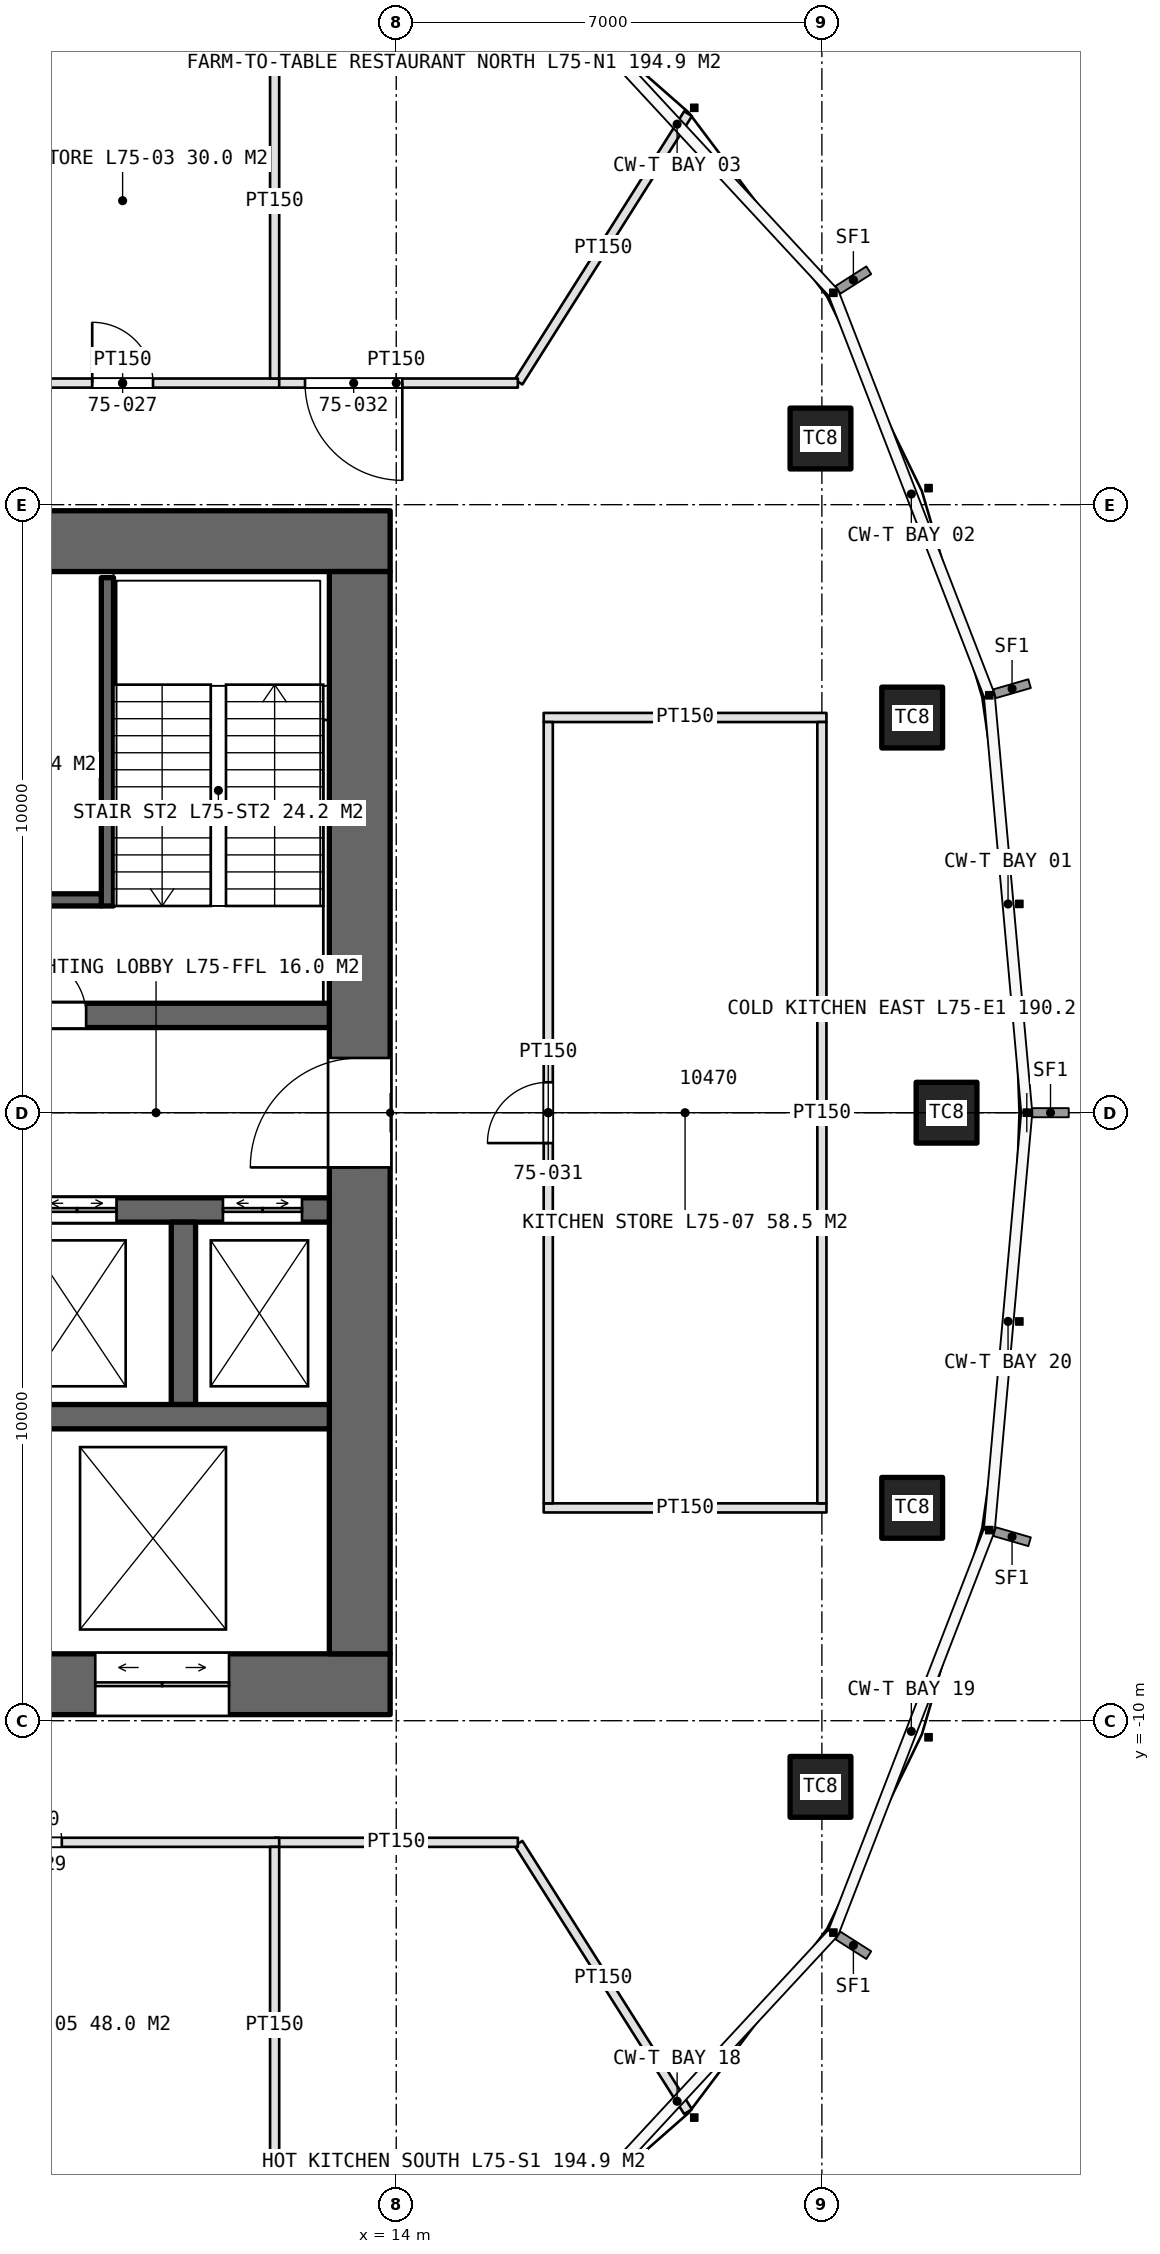
"""IFC4 building model, lengths in metres.
Left out: names, types, materials, properties, quantities, classifications, styles, units other than length and angle.
Written with IfcOpenShell. Run it as: python <this file> out.ifc"""

import sys

from ifc_helpers import new_model, si_unit, direction, frame, frame_2d, origin, origin_2d, place, context, subcontext, project, spatial, rectangle, extrude, element, fill, save


model = new_model("IFC4")
c1 = context("Model", 3, precision=1e-05, world=origin(), true_north=direction((0.0, 1.0)))
c2 = subcontext(c1, "Body", "Model", "MODEL_VIEW")
j1 = project(units=[si_unit("LENGTHUNIT", "METRE"), si_unit("PLANEANGLEUNIT", "RADIAN")], contexts=[c1])
p1 = place(None, origin())
s1 = spatial("IfcSite", under=j1, at=p1, CompositionType="ELEMENT")
p2 = place(p1, origin())
s2 = spatial("IfcBuilding", under=s1, at=p2, CompositionType="ELEMENT")
p3 = place(p2, frame((0.0, 0.0, 334.2)))
s3 = spatial("IfcBuildingStorey", under=s2, at=p3, CompositionType="ELEMENT", Elevation=334.2)
p4 = place(p3, frame((-13.9, -9.4, 0.0), z_axis=(0.0, 0.0, 1.0), x_axis=(1.0, 0.0, 0.0)))
e1 = element("IfcWall", 1, at=p4, inside=s3, PredefinedType="SHEAR", context=c2, shape_type="SweptSolid", body=[
    extrude(rectangle(XDim=27.8, YDim=1.0, at=frame_2d((13.9, 0.0))), origin(), (0.0, 0.0, 1.0), 5.0),
])
p5 = place(p4, frame((22.95, 0.0, 0.0)))
e2 = element("IfcOpeningElement", 2, at=p5, cuts=e1, PredefinedType="OPENING", context=c2, shape_type="SweptSolid", body=[
    extrude(rectangle(XDim=2.2, YDim=2.7, at=frame_2d((1.1, 1.35))), frame((0.0, 0.51, 0.0), z_axis=(0.0, -1.0, 0.0), x_axis=(1.0, 0.0, 0.0)), (0.0, 0.0, 1.0), 1.02),
])
p6 = place(p3, frame((13.9, 9.4, 0.0), z_axis=(0.0, 0.0, 1.0), x_axis=(-1.0, 0.0, 0.0)))
e3 = element("IfcWall", 3, at=p6, inside=s3, PredefinedType="SHEAR", context=c2, shape_type="SweptSolid", body=[
    extrude(rectangle(XDim=27.8, YDim=1.0, at=frame_2d((13.9, 0.0))), origin(), (0.0, 0.0, 1.0), 5.0),
])
p7 = place(p6, frame((23.9, 0.0, 0.0)))
e4 = element("IfcOpeningElement", 4, at=p7, cuts=e3, PredefinedType="OPENING", context=c2, shape_type="SweptSolid", body=[
    extrude(rectangle(XDim=1.0, YDim=2.4, at=frame_2d((0.5, 1.2))), frame((0.0, 0.51, 0.0), z_axis=(0.0, -1.0, 0.0), x_axis=(1.0, 0.0, 0.0)), (0.0, 0.0, 1.0), 1.02),
])
p8 = place(p6, frame((13.0, 0.0, 0.0)))
e5 = element("IfcOpeningElement", 5, at=p8, cuts=e3, PredefinedType="OPENING", context=c2, shape_type="SweptSolid", body=[
    extrude(rectangle(XDim=1.8, YDim=2.4, at=frame_2d((0.9, 1.2))), frame((0.0, 0.51, 0.0), z_axis=(0.0, -1.0, 0.0), x_axis=(1.0, 0.0, 0.0)), (0.0, 0.0, 1.0), 1.02),
])
p9 = place(p3, frame((13.4, -8.9, 0.0), z_axis=(0.0, 0.0, 1.0), x_axis=(0.0, 1.0, 0.0)))
e6 = element("IfcWall", 6, at=p9, inside=s3, PredefinedType="SHEAR", context=c2, shape_type="SweptSolid", body=[
    extrude(rectangle(XDim=17.8, YDim=1.0, at=frame_2d((8.9, 0.0))), origin(), (0.0, 0.0, 1.0), 5.0),
])
p10 = place(p9, frame((8.0, 0.0, 0.0)))
e7 = element("IfcOpeningElement", 7, at=p10, cuts=e6, PredefinedType="OPENING", context=c2, shape_type="SweptSolid", body=[
    extrude(rectangle(XDim=1.8, YDim=2.4, at=frame_2d((0.9, 1.2))), frame((0.0, 0.51, 0.0), z_axis=(0.0, -1.0, 0.0), x_axis=(1.0, 0.0, 0.0)), (0.0, 0.0, 1.0), 1.02),
])
p11 = place(p3, frame((7.2, 1.6, 0.0), z_axis=(0.0, 0.0, 1.0), x_axis=(1.0, 0.0, 0.0)))
e8 = element("IfcWall", 8, at=p11, inside=s3, PredefinedType="SHEAR", context=c2, shape_type="SweptSolid", body=[
    extrude(rectangle(XDim=5.7, YDim=0.4, at=frame_2d((2.85, 0.0))), origin(), (0.0, 0.0, 1.0), 5.0),
])
p12 = place(p11, frame((0.7, 0.0, 0.0)))
e9 = element("IfcOpeningElement", 9, at=p12, cuts=e8, PredefinedType="OPENING", context=c2, shape_type="SweptSolid", body=[
    extrude(rectangle(XDim=1.0, YDim=2.4, at=frame_2d((0.5, 1.2))), frame((0.0, 0.21, 0.0), z_axis=(0.0, -1.0, 0.0), x_axis=(1.0, 0.0, 0.0)), (0.0, 0.0, 1.0), 0.42),
])
p13 = place(p3, frame((7.2, -1.6, 0.0), z_axis=(0.0, 0.0, 1.0), x_axis=(1.0, 0.0, 0.0)))
e10 = element("IfcWall", 10, at=p13, inside=s3, PredefinedType="SHEAR", context=c2, shape_type="SweptSolid", body=[
    extrude(rectangle(XDim=5.7, YDim=0.4, at=frame_2d((2.85, 0.0))), origin(), (0.0, 0.0, 1.0), 5.0),
])
p14 = place(p13, frame((0.9, 0.0, 0.0)))
e11 = element("IfcOpeningElement", 11, at=p14, cuts=e10, PredefinedType="OPENING", context=c2, shape_type="SweptSolid", body=[
    extrude(rectangle(XDim=1.3, YDim=2.4, at=frame_2d((0.65, 1.2))), frame((0.0, 0.21, 0.0), z_axis=(0.0, -1.0, 0.0), x_axis=(1.0, 0.0, 0.0)), (0.0, 0.0, 1.0), 0.42),
])
p15 = place(p13, frame((3.95, 0.0, 0.0)))
e12 = element("IfcOpeningElement", 12, at=p15, cuts=e10, PredefinedType="OPENING", context=c2, shape_type="SweptSolid", body=[
    extrude(rectangle(XDim=1.3, YDim=2.4, at=frame_2d((0.65, 1.2))), frame((0.0, 0.21, 0.0), z_axis=(0.0, -1.0, 0.0), x_axis=(1.0, 0.0, 0.0)), (0.0, 0.0, 1.0), 0.42),
])
p16 = place(p3, frame((10.5, -4.8, 0.0), z_axis=(0.0, 0.0, 1.0), x_axis=(0.0, 1.0, 0.0)))
e13 = element("IfcWall", 13, at=p16, inside=s3, PredefinedType="SHEAR", context=c2, shape_type="SweptSolid", body=[
    extrude(rectangle(XDim=3.0, YDim=0.4, at=frame_2d((1.5, 0.0))), origin(), (0.0, 0.0, 1.0), 5.0),
])
p17 = place(p3, frame((7.2, -5.0, 0.0), z_axis=(0.0, 0.0, 1.0), x_axis=(1.0, 0.0, 0.0)))
e14 = element("IfcWall", 14, at=p17, inside=s3, PredefinedType="SHEAR", context=c2, shape_type="SweptSolid", body=[
    extrude(rectangle(XDim=5.7, YDim=0.4, at=frame_2d((2.85, 0.0))), origin(), (0.0, 0.0, 1.0), 5.0),
])
for number, where, z_axis, x_axis in (
    (15, (23.05, 0.0, 0.0), (0.0, 0.0, 1.0), (1.0, 0.0, 0.0)),
    (16, (22.485, 6.499, 0.0), (0.0, 0.0, 1.0), (1.0, 0.0, 0.0)),
    (17, (20.977, 11.088, 0.0), (0.0, 0.0, 1.0), (1.0, 0.0, 0.0)),
    (18, (20.977, -11.088, 0.0), (0.0, 0.0, 1.0), (1.0, 0.0, 0.0)),
    (19, (22.485, -6.499, 0.0), (0.0, 0.0, 1.0), (1.0, 0.0, 0.0)),
):
    element("IfcColumn", number, at=place(p3, frame(where, z_axis=z_axis, x_axis=x_axis)), inside=s3, PredefinedType="COLUMN", context=c2, shape_type="SweptSolid", body=[
        extrude(rectangle(XDim=1.0, YDim=1.0, at=origin_2d()), origin(), (0.0, 0.0, 1.0), 5.0),
    ])
p18 = place(p3, frame((9.25, 3.4, 0.0), z_axis=(0.0, 0.0, 1.0), x_axis=(0.0, 1.0, 0.0)))
e20 = element("IfcWall", 20, at=p18, inside=s3, PredefinedType="SOLIDWALL", context=c2, shape_type="SweptSolid", body=[
    extrude(rectangle(XDim=5.4, YDim=0.2, at=frame_2d((2.7, 0.0))), origin(), (0.0, 0.0, 1.0), 5.0),
])
p19 = place(p3, frame((9.15, 3.5, 0.0), z_axis=(0.0, 0.0, 1.0), x_axis=(-1.0, 0.0, 0.0)))
e21 = element("IfcWall", 21, at=p19, inside=s3, PredefinedType="SOLIDWALL", context=c2, shape_type="SweptSolid", body=[
    extrude(rectangle(XDim=1.95, YDim=0.2, at=frame_2d((0.975, 0.0))), origin(), (0.0, 0.0, 1.0), 5.0),
])
for number, where, z_axis, x_axis in (
    (22, (16.011, -12.017, 0.0), (0.0, 0.0, 1.0), (0.534, -0.845, 0.0)),
    (23, (16.011, 12.017, 0.0), (0.0, 0.0, 1.0), (0.534, 0.845, 0.0)),
):
    element("IfcWall", number, at=place(p3, frame(where, z_axis=z_axis, x_axis=x_axis)), inside=s3, PredefinedType="PARTITIONING", context=c2, shape_type="SweptSolid", body=[
        extrude(rectangle(XDim=5.22, YDim=0.15, at=frame_2d((2.61, 0.0))), origin(), (0.0, 0.0, 1.0), 3.4),
    ])
p20 = place(p3, frame((16.0, 12.0, 0.0), z_axis=(0.0, 0.0, 1.0), x_axis=(-1.0, 0.0, 0.0)))
e24 = element("IfcWall", 24, at=p20, inside=s3, PredefinedType="PARTITIONING", context=c2, shape_type="SweptSolid", body=[
    extrude(rectangle(XDim=4.0, YDim=0.15, at=frame_2d((2.0, 0.0))), origin(), (0.0, 0.0, 1.0), 3.4),
])
p21 = place(p20, frame((1.9, 0.0, 0.0)))
e25 = element("IfcOpeningElement", 25, at=p21, cuts=e24, PredefinedType="OPENING", context=c2, shape_type="SweptSolid", body=[
    extrude(rectangle(XDim=1.6, YDim=2.4, at=frame_2d((0.8, 1.2))), frame((0.0, 0.085, 0.0), z_axis=(0.0, -1.0, 0.0), x_axis=(1.0, 0.0, 0.0)), (0.0, 0.0, 1.0), 0.17),
])
p22 = place(p3, frame((12.0, -12.0, 0.0), z_axis=(0.0, 0.0, 1.0), x_axis=(1.0, 0.0, 0.0)))
e26 = element("IfcWall", 26, at=p22, inside=s3, PredefinedType="PARTITIONING", context=c2, shape_type="SweptSolid", body=[
    extrude(rectangle(XDim=4.0, YDim=0.15, at=frame_2d((2.0, 0.0))), origin(), (0.0, 0.0, 1.0), 3.4),
])
p23 = place(p3, frame((6.925, 12.0, 0.0), z_axis=(0.0, 0.0, 1.0), x_axis=(1.0, 0.0, 0.0)))
e27 = element("IfcWall", 27, at=p23, inside=s3, PredefinedType="PARTITIONING", context=c2, shape_type="SweptSolid", body=[
    extrude(rectangle(XDim=5.15, YDim=0.15, at=frame_2d((2.575, 0.0))), origin(), (0.0, 0.0, 1.0), 3.4),
])
p24 = place(p23, frame((2.075, 0.0, 0.0)))
e28 = element("IfcOpeningElement", 28, at=p24, cuts=e27, PredefinedType="OPENING", context=c2, shape_type="SweptSolid", body=[
    extrude(rectangle(XDim=1.0, YDim=2.2, at=frame_2d((0.5, 1.1))), frame((0.0, 0.085, 0.0), z_axis=(0.0, -1.0, 0.0), x_axis=(1.0, 0.0, 0.0)), (0.0, 0.0, 1.0), 0.17),
])
p25 = place(p3, frame((12.0, 12.075, 0.0), z_axis=(0.0, 0.0, 1.0), x_axis=(0.0, 1.0, 0.0)))
e29 = element("IfcWall", 29, at=p25, inside=s3, PredefinedType="PARTITIONING", context=c2, shape_type="SweptSolid", body=[
    extrude(rectangle(XDim=5.85, YDim=0.15, at=frame_2d((2.925, 0.0))), origin(), (0.0, 0.0, 1.0), 3.4),
])
p26 = place(p3, frame((3.925, -12.0, 0.0), z_axis=(0.0, 0.0, 1.0), x_axis=(1.0, 0.0, 0.0)))
e30 = element("IfcWall", 30, at=p26, inside=s3, PredefinedType="PARTITIONING", context=c2, shape_type="SweptSolid", body=[
    extrude(rectangle(XDim=8.15, YDim=0.15, at=frame_2d((4.075, 0.0))), origin(), (0.0, 0.0, 1.0), 3.4),
])
p27 = place(p26, frame((3.575, 0.0, 0.0)))
e31 = element("IfcOpeningElement", 31, at=p27, cuts=e30, PredefinedType="OPENING", context=c2, shape_type="SweptSolid", body=[
    extrude(rectangle(XDim=1.0, YDim=2.2, at=frame_2d((0.5, 1.1))), frame((0.0, 0.085, 0.0), z_axis=(0.0, -1.0, 0.0), x_axis=(1.0, 0.0, 0.0)), (0.0, 0.0, 1.0), 0.17),
])
p28 = place(p3, frame((12.0, -17.925, 0.0), z_axis=(0.0, 0.0, 1.0), x_axis=(0.0, 1.0, 0.0)))
e32 = element("IfcWall", 32, at=p28, inside=s3, PredefinedType="PARTITIONING", context=c2, shape_type="SweptSolid", body=[
    extrude(rectangle(XDim=5.85, YDim=0.15, at=frame_2d((2.925, 0.0))), origin(), (0.0, 0.0, 1.0), 3.4),
])
for number, where, z_axis, x_axis in (
    (33, (16.425, -6.5, 0.0), (0.0, 0.0, 1.0), (1.0, 0.0, 0.0)),
    (34, (16.425, 6.5, 0.0), (0.0, 0.0, 1.0), (1.0, 0.0, 0.0)),
):
    element("IfcWall", number, at=place(p3, frame(where, z_axis=z_axis, x_axis=x_axis)), inside=s3, PredefinedType="PARTITIONING", context=c2, shape_type="SweptSolid", body=[
        extrude(rectangle(XDim=4.65, YDim=0.15, at=frame_2d((2.325, 0.0))), origin(), (0.0, 0.0, 1.0), 3.4),
    ])
p29 = place(p3, frame((16.5, -6.425, 0.0), z_axis=(0.0, 0.0, 1.0), x_axis=(0.0, 1.0, 0.0)))
e35 = element("IfcWall", 35, at=p29, inside=s3, PredefinedType="PARTITIONING", context=c2, shape_type="SweptSolid", body=[
    extrude(rectangle(XDim=12.85, YDim=0.15, at=frame_2d((6.425, 0.0))), origin(), (0.0, 0.0, 1.0), 3.4),
])
p30 = place(p29, frame((5.925, 0.0, 0.0)))
e36 = element("IfcOpeningElement", 36, at=p30, cuts=e35, PredefinedType="OPENING", context=c2, shape_type="SweptSolid", body=[
    extrude(rectangle(XDim=1.0, YDim=2.2, at=frame_2d((0.5, 1.1))), frame((0.0, 0.085, 0.0), z_axis=(0.0, -1.0, 0.0), x_axis=(1.0, 0.0, 0.0)), (0.0, 0.0, 1.0), 0.17),
])
p31 = place(p3, frame((21.0, -6.425, 0.0), z_axis=(0.0, 0.0, 1.0), x_axis=(0.0, 1.0, 0.0)))
e37 = element("IfcWall", 37, at=p31, inside=s3, PredefinedType="PARTITIONING", context=c2, shape_type="SweptSolid", body=[
    extrude(rectangle(XDim=12.85, YDim=0.15, at=frame_2d((6.425, 0.0))), origin(), (0.0, 0.0, 1.0), 3.4),
])
p32 = place(p10, origin())
e38 = element("IfcDoor", 38, at=p32, inside=s3, OperationType="DOUBLE_DOOR_SINGLE_SWING", PredefinedType="DOOR", context=c2, shape_type="SweptSolid", body=[
    extrude(rectangle(XDim=1.8, YDim=2.4, at=frame_2d((0.9, 1.2))), frame((0.0, 0.025, 0.0), z_axis=(0.0, -1.0, 0.0), x_axis=(1.0, 0.0, 0.0)), (0.0, 0.0, 1.0), 0.05),
])
fill(e7, e38)
p33 = place(p12, origin())
e39 = element("IfcDoor", 39, at=p33, inside=s3, OperationType="SINGLE_SWING_LEFT", PredefinedType="DOOR", context=c2, shape_type="SweptSolid", body=[
    extrude(rectangle(XDim=1.0, YDim=2.4, at=frame_2d((0.5, 1.2))), frame((0.0, 0.025, 0.0), z_axis=(0.0, -1.0, 0.0), x_axis=(1.0, 0.0, 0.0)), (0.0, 0.0, 1.0), 0.05),
])
fill(e9, e39)
p34 = place(p14, origin())
e40 = element("IfcDoor", 40, at=p34, inside=s3, OperationType="DOUBLE_DOOR_SLIDING", PredefinedType="DOOR", context=c2, shape_type="SweptSolid", body=[
    extrude(rectangle(XDim=1.3, YDim=2.4, at=frame_2d((0.65, 1.2))), frame((0.0, 0.025, 0.0), z_axis=(0.0, -1.0, 0.0), x_axis=(1.0, 0.0, 0.0)), (0.0, 0.0, 1.0), 0.05),
])
fill(e11, e40)
p35 = place(p15, origin())
e41 = element("IfcDoor", 41, at=p35, inside=s3, OperationType="DOUBLE_DOOR_SLIDING", PredefinedType="DOOR", context=c2, shape_type="SweptSolid", body=[
    extrude(rectangle(XDim=1.3, YDim=2.4, at=frame_2d((0.65, 1.2))), frame((0.0, 0.025, 0.0), z_axis=(0.0, -1.0, 0.0), x_axis=(1.0, 0.0, 0.0)), (0.0, 0.0, 1.0), 0.05),
])
fill(e12, e41)
p36 = place(p5, origin())
e42 = element("IfcDoor", 42, at=p36, inside=s3, OperationType="DOUBLE_DOOR_SLIDING", PredefinedType="DOOR", context=c2, shape_type="SweptSolid", body=[
    extrude(rectangle(XDim=2.2, YDim=2.7, at=frame_2d((1.1, 1.35))), frame((0.0, 0.025, 0.0), z_axis=(0.0, -1.0, 0.0), x_axis=(1.0, 0.0, 0.0)), (0.0, 0.0, 1.0), 0.05),
])
fill(e2, e42)
p37 = place(p24, origin())
e43 = element("IfcDoor", 43, at=p37, inside=s3, OperationType="SINGLE_SWING_LEFT", PredefinedType="DOOR", context=c2, shape_type="SweptSolid", body=[
    extrude(rectangle(XDim=1.0, YDim=2.2, at=frame_2d((0.5, 1.1))), frame((0.0, 0.025, 0.0), z_axis=(0.0, -1.0, 0.0), x_axis=(1.0, 0.0, 0.0)), (0.0, 0.0, 1.0), 0.05),
])
fill(e28, e43)
p38 = place(p27, origin())
e44 = element("IfcDoor", 44, at=p38, inside=s3, OperationType="SINGLE_SWING_LEFT", PredefinedType="DOOR", context=c2, shape_type="SweptSolid", body=[
    extrude(rectangle(XDim=1.0, YDim=2.2, at=frame_2d((0.5, 1.1))), frame((0.0, 0.025, 0.0), z_axis=(0.0, -1.0, 0.0), x_axis=(1.0, 0.0, 0.0)), (0.0, 0.0, 1.0), 0.05),
])
fill(e31, e44)
p39 = place(p30, origin())
e45 = element("IfcDoor", 45, at=p39, inside=s3, OperationType="SINGLE_SWING_LEFT", PredefinedType="DOOR", context=c2, shape_type="SweptSolid", body=[
    extrude(rectangle(XDim=1.0, YDim=2.2, at=frame_2d((0.5, 1.1))), frame((0.0, 0.025, 0.0), z_axis=(0.0, -1.0, 0.0), x_axis=(1.0, 0.0, 0.0)), (0.0, 0.0, 1.0), 0.05),
])
fill(e36, e45)
p40 = place(p21, origin())
e46 = element("IfcDoor", 46, at=p40, inside=s3, OperationType="DOUBLE_DOOR_SINGLE_SWING", PredefinedType="DOOR", context=c2, shape_type="SweptSolid", body=[
    extrude(rectangle(XDim=1.6, YDim=2.4, at=frame_2d((0.8, 1.2))), frame((0.0, 0.025, 0.0), z_axis=(0.0, -1.0, 0.0), x_axis=(1.0, 0.0, 0.0)), (0.0, 0.0, 1.0), 0.05),
])
fill(e25, e46)
save(model, sys.argv[1])
